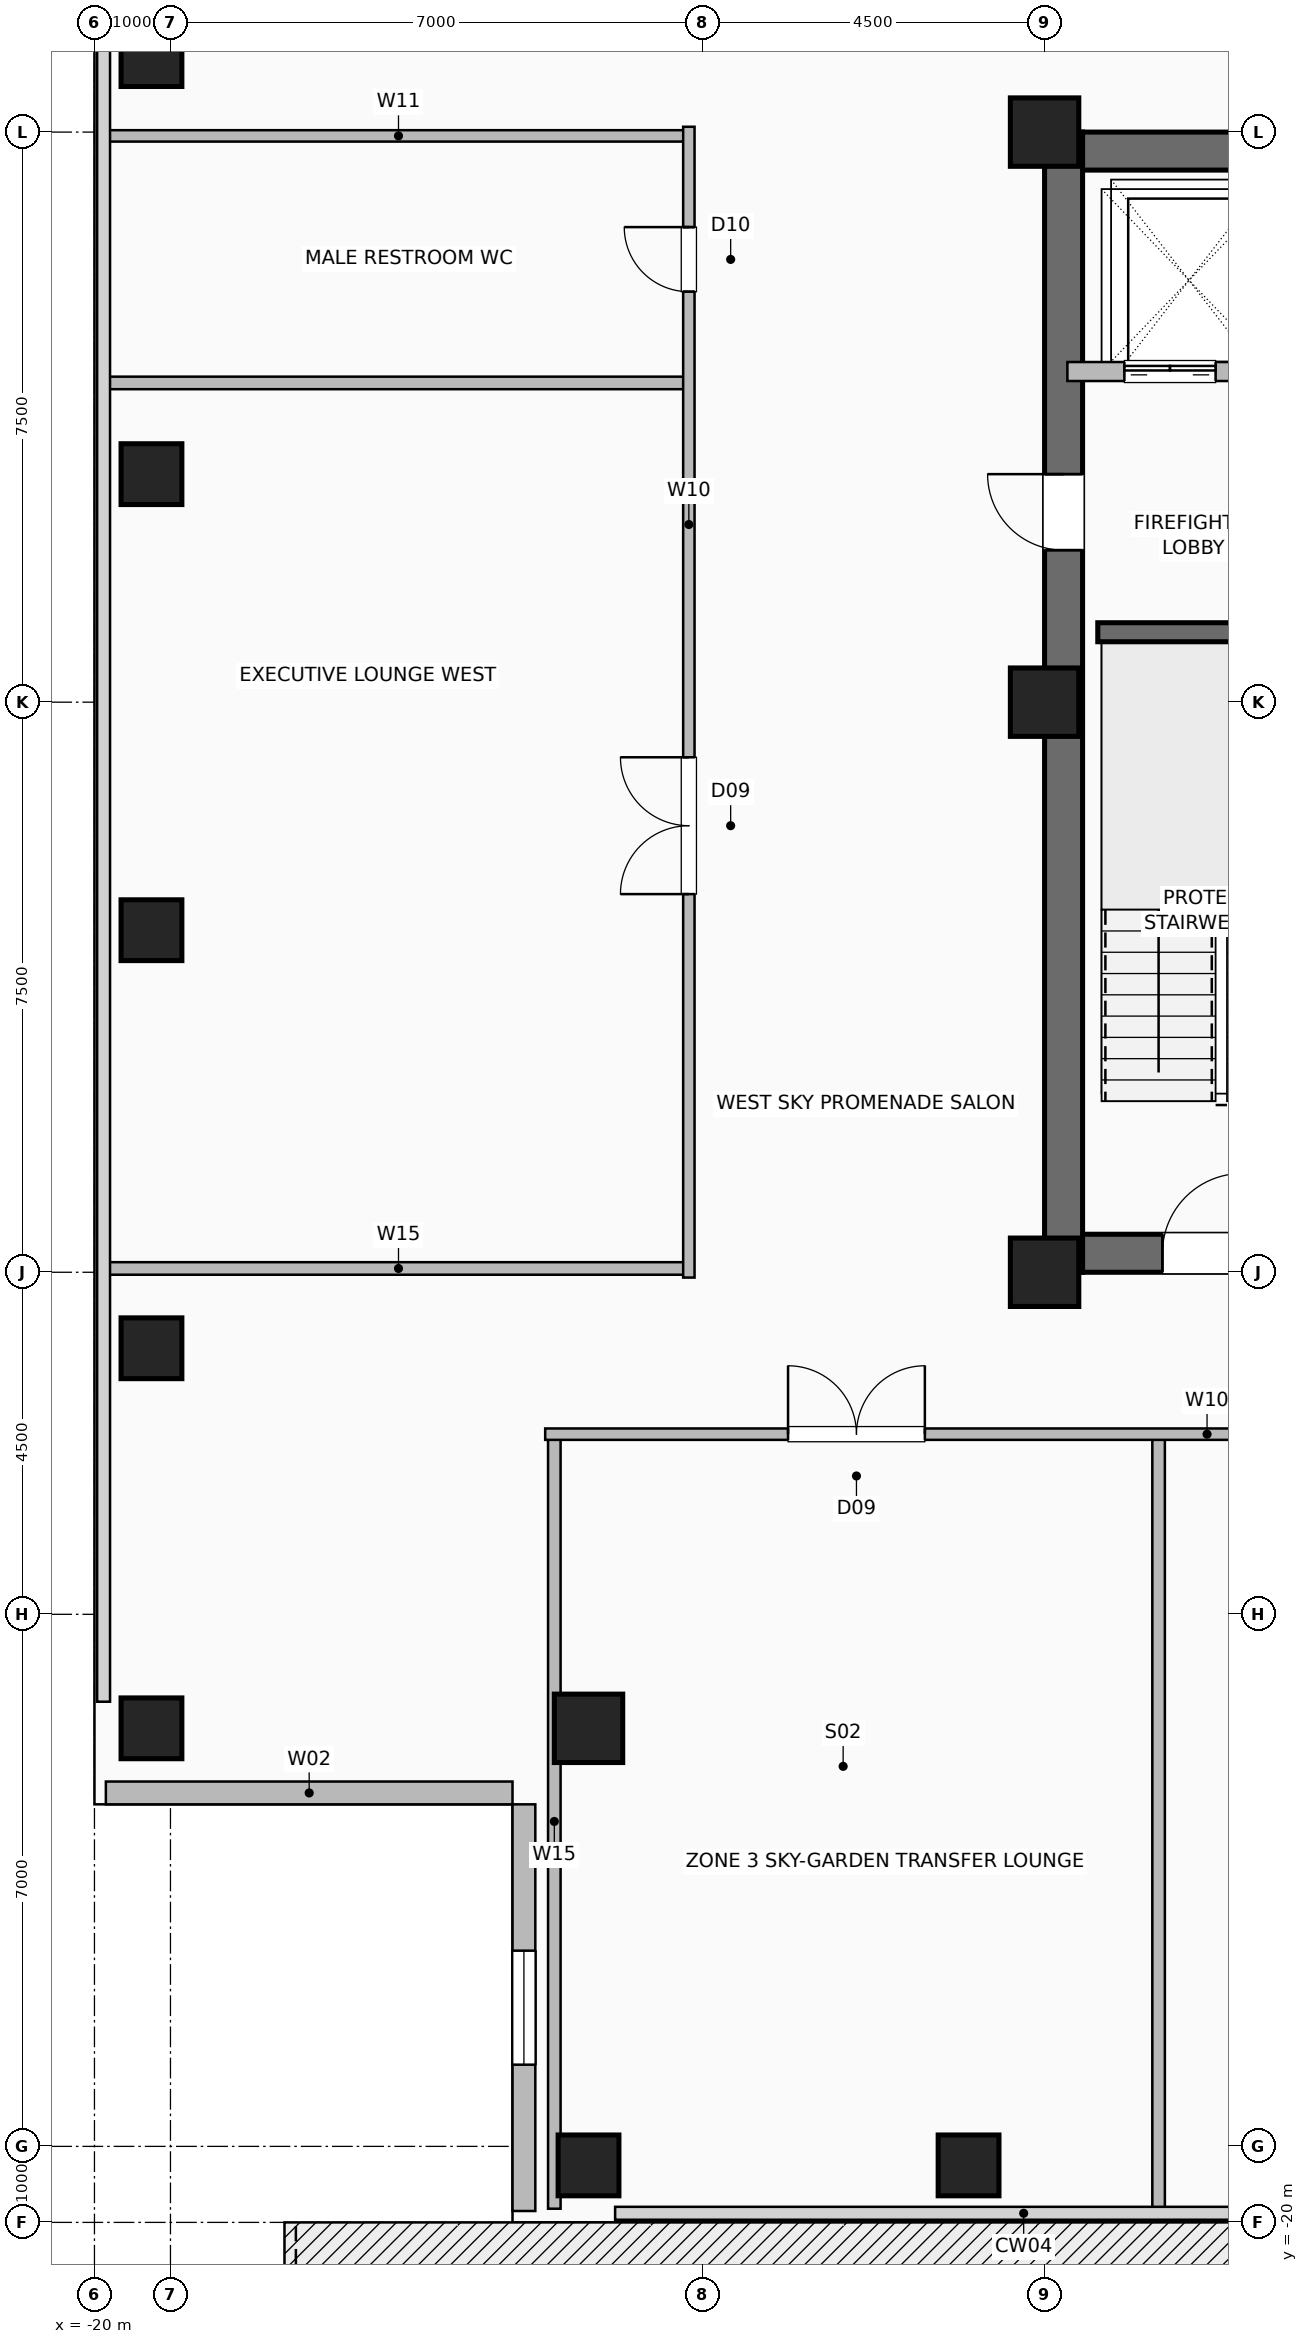
"""IFC4 building model, lengths in metres.
Left out: names, types, materials, properties, quantities, classifications, styles, units other than length and angle.
Written with IfcOpenShell. Run it as: python <this file> out.ifc"""

import sys

from ifc_helpers import new_model, si_unit, direction, frame, frame_2d, origin, origin_2d, place, context, subcontext, project, spatial, rectangle, hollow_rectangle, extrude, element, fill, save


model = new_model("IFC4")
c1 = context("Model", 3, precision=1e-05, world=origin(), true_north=direction((0.0, 1.0)))
c2 = subcontext(c1, "Body", "Model", "MODEL_VIEW")
j1 = project(units=[si_unit("LENGTHUNIT", "METRE"), si_unit("PLANEANGLEUNIT", "RADIAN")], contexts=[c1])
p1 = place(None, origin())
s1 = spatial("IfcSite", under=j1, at=p1, CompositionType="ELEMENT")
p2 = place(p1, origin())
s2 = spatial("IfcBuilding", under=s1, at=p2, CompositionType="ELEMENT")
p3 = place(p2, frame((0.0, 0.0, 166.2)))
s3 = spatial("IfcBuildingStorey", under=s2, at=p3, CompositionType="ELEMENT", Elevation=166.2)
for number, where, z_axis, x_axis in (
    (1, (-7.5, -7.5, 0.0), (0.0, 0.0, 1.0), (1.0, 0.0, 0.0)),
    (2, (-7.5, 7.5, 0.0), (0.0, 0.0, 1.0), (1.0, 0.0, 0.0)),
    (3, (-7.5, 0.0, 0.0), (0.0, 0.0, 1.0), (1.0, 0.0, 0.0)),
):
    element("IfcColumn", number, at=place(p3, frame(where, z_axis=z_axis, x_axis=x_axis)), inside=s3, PredefinedType="COLUMN", context=c2, shape_type="SweptSolid", body=[
        extrude(hollow_rectangle(XDim=0.9, YDim=0.9, WallThickness=0.045, at=origin_2d()), origin(), (0.0, 0.0, 1.0), 3.6),
    ])
for number, where, z_axis, x_axis in (
    (4, (-13.5, -19.25, -0.4), (0.0, 0.0, 1.0), (1.0, 0.0, 0.0)),
    (5, (-19.25, -13.5, -0.4), (0.0, 0.0, 1.0), (1.0, 0.0, 0.0)),
    (6, (-8.5, -19.25, -0.4), (0.0, 0.0, 1.0), (1.0, 0.0, 0.0)),
    (7, (-19.25, -8.5, -0.4), (0.0, 0.0, 1.0), (1.0, 0.0, 0.0)),
    (8, (-19.25, -3.0, -0.4), (0.0, 0.0, 1.0), (1.0, 0.0, 0.0)),
    (9, (-19.25, 3.0, -0.4), (0.0, 0.0, 1.0), (1.0, 0.0, 0.0)),
    (10, (-19.25, 8.5, -0.4), (0.0, 0.0, 1.0), (1.0, 0.0, 0.0)),
):
    element("IfcColumn", number, at=place(p3, frame(where, z_axis=z_axis, x_axis=x_axis)), inside=s3, PredefinedType="COLUMN", context=c2, shape_type="SweptSolid", body=[
        extrude(hollow_rectangle(XDim=0.8, YDim=0.8, WallThickness=0.04, at=origin_2d()), origin(), (0.0, 0.0, 1.0), 4.0),
    ])
p4 = place(p3, frame((-13.5, -13.5, -0.4), z_axis=(0.0, 0.0, 1.0), x_axis=(1.0, 0.0, 0.0)))
e11 = element("IfcColumn", 11, at=p4, inside=s3, PredefinedType="COLUMN", context=c2, shape_type="SweptSolid", body=[
    extrude(hollow_rectangle(XDim=0.9, YDim=0.9, WallThickness=0.045, at=origin_2d()), origin(), (0.0, 0.0, 1.0), 4.0),
])
p5 = place(p3, frame((-14.35, -19.85, 0.0), z_axis=(0.0, 0.0, 1.0), x_axis=(0.0, 1.0, 0.0)))
e12 = element("IfcWall", 12, at=p5, inside=s3, PredefinedType="SOLIDWALL", context=c2, shape_type="SweptSolid", body=[
    extrude(rectangle(XDim=5.35, YDim=0.3, at=frame_2d((2.675, 0.0))), origin(), (0.0, 0.0, 1.0), 3.36),
])
p6 = place(p5, frame((1.925, 0.0, 0.9)))
e13 = element("IfcOpeningElement", 13, at=p6, cuts=e12, PredefinedType="OPENING", context=c2, shape_type="SweptSolid", body=[
    extrude(rectangle(XDim=1.5, YDim=1.8, at=frame_2d((0.75, 0.9))), frame((0.0, 0.16, 0.0), z_axis=(0.0, -1.0, 0.0), x_axis=(1.0, 0.0, 0.0)), (0.0, 0.0, 1.0), 0.32),
])
p7 = place(p3, frame((-19.85, -14.35, 0.0), z_axis=(0.0, 0.0, 1.0), x_axis=(1.0, 0.0, 0.0)))
e14 = element("IfcWall", 14, at=p7, inside=s3, PredefinedType="SOLIDWALL", context=c2, shape_type="SweptSolid", body=[
    extrude(rectangle(XDim=5.35, YDim=0.3, at=frame_2d((2.675, 0.0))), origin(), (0.0, 0.0, 1.0), 3.36),
])
p8 = place(p3, frame((-7.5, -7.25, 0.0), z_axis=(0.0, 0.0, 1.0), x_axis=(1.0, 0.0, 0.0)))
e15 = element("IfcWall", 15, at=p8, inside=s3, PredefinedType="SHEAR", context=c2, shape_type="SweptSolid", body=[
    extrude(rectangle(XDim=15.0, YDim=0.5, at=frame_2d((7.5, 0.0))), origin(), (0.0, 0.0, 1.0), 3.36),
])
p9 = place(p8, frame((1.55, 0.0, 0.0)))
e16 = element("IfcOpeningElement", 16, at=p9, cuts=e15, PredefinedType="OPENING", context=c2, shape_type="SweptSolid", body=[
    extrude(rectangle(XDim=1.05, YDim=2.08, at=frame_2d((0.525, 1.04))), frame((0.0, 0.26, 0.0), z_axis=(0.0, -1.0, 0.0), x_axis=(1.0, 0.0, 0.0)), (0.0, 0.0, 1.0), 0.52),
])
p10 = place(p8, frame((12.4, 0.0, 0.0)))
e17 = element("IfcOpeningElement", 17, at=p10, cuts=e15, PredefinedType="OPENING", context=c2, shape_type="SweptSolid", body=[
    extrude(rectangle(XDim=1.05, YDim=2.08, at=frame_2d((0.525, 1.04))), frame((0.0, 0.26, 0.0), z_axis=(0.0, -1.0, 0.0), x_axis=(1.0, 0.0, 0.0)), (0.0, 0.0, 1.0), 0.52),
])
p11 = place(p8, frame((5.2, 0.0, 0.0)))
e18 = element("IfcOpeningElement", 18, at=p11, cuts=e15, PredefinedType="OPENING", context=c2, shape_type="SweptSolid", body=[
    extrude(rectangle(XDim=1.0, YDim=2.08, at=frame_2d((0.5, 1.04))), frame((0.0, 0.26, 0.0), z_axis=(0.0, -1.0, 0.0), x_axis=(1.0, 0.0, 0.0)), (0.0, 0.0, 1.0), 0.52),
])
p12 = place(p8, frame((8.65, 0.0, 0.0)))
e19 = element("IfcOpeningElement", 19, at=p12, cuts=e15, PredefinedType="OPENING", context=c2, shape_type="SweptSolid", body=[
    extrude(rectangle(XDim=1.0, YDim=2.08, at=frame_2d((0.5, 1.04))), frame((0.0, 0.26, 0.0), z_axis=(0.0, -1.0, 0.0), x_axis=(1.0, 0.0, 0.0)), (0.0, 0.0, 1.0), 0.52),
])
p13 = place(p3, frame((-7.5, 7.25, 0.0), z_axis=(0.0, 0.0, 1.0), x_axis=(1.0, 0.0, 0.0)))
e20 = element("IfcWall", 20, at=p13, inside=s3, PredefinedType="SHEAR", context=c2, shape_type="SweptSolid", body=[
    extrude(rectangle(XDim=15.0, YDim=0.5, at=frame_2d((7.5, 0.0))), origin(), (0.0, 0.0, 1.0), 3.36),
])
p14 = place(p3, frame((-7.25, -7.5, 0.0), z_axis=(0.0, 0.0, 1.0), x_axis=(0.0, 1.0, 0.0)))
e21 = element("IfcWall", 21, at=p14, inside=s3, PredefinedType="SHEAR", context=c2, shape_type="SweptSolid", body=[
    extrude(rectangle(XDim=15.0, YDim=0.5, at=frame_2d((7.5, 0.0))), origin(), (0.0, 0.0, 1.0), 3.36),
])
p15 = place(p14, frame((9.5, 0.0, 0.0)))
e22 = element("IfcOpeningElement", 22, at=p15, cuts=e21, PredefinedType="OPENING", context=c2, shape_type="SweptSolid", body=[
    extrude(rectangle(XDim=1.0, YDim=2.08, at=frame_2d((0.5, 1.04))), frame((0.0, 0.26, 0.0), z_axis=(0.0, -1.0, 0.0), x_axis=(1.0, 0.0, 0.0)), (0.0, 0.0, 1.0), 0.52),
])
p16 = place(p3, frame((-6.8, 0.92, 0.0), z_axis=(0.0, 0.0, 1.0), x_axis=(1.0, 0.0, 0.0)))
e23 = element("IfcWall", 23, at=p16, inside=s3, PredefinedType="SHEAR", context=c2, shape_type="SweptSolid", body=[
    extrude(rectangle(XDim=3.33, YDim=0.25, at=frame_2d((1.665, 0.0))), origin(), (0.0, 0.0, 1.0), 3.36),
])
p17 = place(p3, frame((-7.2, 4.35, 0.0), z_axis=(0.0, 0.0, 1.0), x_axis=(1.0, 0.0, 0.0)))
e24 = element("IfcWall", 24, at=p17, inside=s3, PredefinedType="SHEAR", context=c2, shape_type="SweptSolid", body=[
    extrude(rectangle(XDim=2.7, YDim=0.25, at=frame_2d((1.35, 0.0))), origin(), (0.0, 0.0, 1.0), 3.36),
])
p18 = place(p17, frame((0.75, 0.0, 0.0)))
e25 = element("IfcOpeningElement", 25, at=p18, cuts=e24, PredefinedType="OPENING", context=c2, shape_type="SweptSolid", body=[
    extrude(rectangle(XDim=1.2, YDim=2.2, at=frame_2d((0.6, 1.1))), frame((0.0, 0.135, 0.0), z_axis=(0.0, -1.0, 0.0), x_axis=(1.0, 0.0, 0.0)), (0.0, 0.0, 1.0), 0.27),
])
for number, where, z_axis, x_axis in (
    (26, (-13.95, -19.82, 0.0), (0.0, 0.0, 1.0), (0.0, 1.0, 0.0)),
    (27, (-6.0, -19.82, 0.0), (0.0, 0.0, 1.0), (0.0, 1.0, 0.0)),
):
    element("IfcWall", number, at=place(p3, frame(where, z_axis=z_axis, x_axis=x_axis)), inside=s3, PredefinedType="PLUMBINGWALL", context=c2, shape_type="SweptSolid", body=[
        extrude(rectangle(XDim=10.19, YDim=0.165, at=frame_2d((5.095, 0.0))), origin(), (0.0, 0.0, 1.0), 3.36),
    ])
p19 = place(p3, frame((-14.07, -9.63, 0.0), z_axis=(0.0, 0.0, 1.0), x_axis=(1.0, 0.0, 0.0)))
e28 = element("IfcWall", 28, at=p19, inside=s3, PredefinedType="PARTITIONING", context=c2, shape_type="SweptSolid", body=[
    extrude(rectangle(XDim=28.14, YDim=0.15, at=frame_2d((14.07, 0.0))), origin(), (0.0, 0.0, 1.0), 3.36),
])
p20 = place(p19, frame((3.195, 0.0, 0.0)))
e29 = element("IfcOpeningElement", 29, at=p20, cuts=e28, PredefinedType="OPENING", context=c2, shape_type="SweptSolid", body=[
    extrude(rectangle(XDim=1.8, YDim=2.08, at=frame_2d((0.9, 1.04))), frame((0.0, 0.085, 0.0), z_axis=(0.0, -1.0, 0.0), x_axis=(1.0, 0.0, 0.0)), (0.0, 0.0, 1.0), 0.17),
])
p21 = place(p19, frame((12.42, 0.0, 0.0)))
e30 = element("IfcOpeningElement", 30, at=p21, cuts=e28, PredefinedType="OPENING", context=c2, shape_type="SweptSolid", body=[
    extrude(rectangle(XDim=1.8, YDim=2.08, at=frame_2d((0.9, 1.04))), frame((0.0, 0.085, 0.0), z_axis=(0.0, -1.0, 0.0), x_axis=(1.0, 0.0, 0.0)), (0.0, 0.0, 1.0), 0.17),
])
p22 = place(p19, frame((21.445, 0.0, 0.0)))
e31 = element("IfcOpeningElement", 31, at=p22, cuts=e28, PredefinedType="OPENING", context=c2, shape_type="SweptSolid", body=[
    extrude(rectangle(XDim=0.95, YDim=2.06, at=frame_2d((0.475, 1.03))), frame((0.0, 0.085, 0.0), z_axis=(0.0, -1.0, 0.0), x_axis=(1.0, 0.0, 0.0)), (0.0, 0.0, 1.0), 0.17),
])
p23 = place(p19, frame((26.22, 0.0, 0.0)))
e32 = element("IfcOpeningElement", 32, at=p23, cuts=e28, PredefinedType="OPENING", context=c2, shape_type="SweptSolid", body=[
    extrude(rectangle(XDim=0.85, YDim=2.05, at=frame_2d((0.425, 1.025))), frame((0.0, 0.085, 0.0), z_axis=(0.0, -1.0, 0.0), x_axis=(1.0, 0.0, 0.0)), (0.0, 0.0, 1.0), 0.17),
])
for number, where, z_axis, x_axis in (
    (33, (-19.82, -7.45, 0.0), (0.0, 0.0, 1.0), (1.0, 0.0, 0.0)),
    (34, (-19.82, 4.2, 0.0), (0.0, 0.0, 1.0), (1.0, 0.0, 0.0)),
):
    element("IfcWall", number, at=place(p3, frame(where, z_axis=z_axis, x_axis=x_axis)), inside=s3, PredefinedType="PLUMBINGWALL", context=c2, shape_type="SweptSolid", body=[
        extrude(rectangle(XDim=7.64, YDim=0.165, at=frame_2d((3.82, 0.0))), origin(), (0.0, 0.0, 1.0), 3.36),
    ])
p24 = place(p3, frame((-19.82, 7.45, 0.0), z_axis=(0.0, 0.0, 1.0), x_axis=(1.0, 0.0, 0.0)))
e35 = element("IfcWall", 35, at=p24, inside=s3, PredefinedType="PARTITIONING", context=c2, shape_type="SweptSolid", body=[
    extrude(rectangle(XDim=7.64, YDim=0.15, at=frame_2d((3.82, 0.0))), origin(), (0.0, 0.0, 1.0), 3.36),
])
p25 = place(p3, frame((-12.18, -7.57, 0.0), z_axis=(0.0, 0.0, 1.0), x_axis=(0.0, 1.0, 0.0)))
e36 = element("IfcWall", 36, at=p25, inside=s3, PredefinedType="PARTITIONING", context=c2, shape_type="SweptSolid", body=[
    extrude(rectangle(XDim=15.14, YDim=0.15, at=frame_2d((7.57, 0.0))), origin(), (0.0, 0.0, 1.0), 3.36),
])
p26 = place(p25, frame((5.045, 0.0, 0.0)))
e37 = element("IfcOpeningElement", 37, at=p26, cuts=e36, PredefinedType="OPENING", context=c2, shape_type="SweptSolid", body=[
    extrude(rectangle(XDim=1.8, YDim=2.08, at=frame_2d((0.9, 1.04))), frame((0.0, 0.085, 0.0), z_axis=(0.0, -1.0, 0.0), x_axis=(1.0, 0.0, 0.0)), (0.0, 0.0, 1.0), 0.17),
])
p27 = place(p25, frame((12.97, 0.0, 0.0)))
e38 = element("IfcOpeningElement", 38, at=p27, cuts=e36, PredefinedType="OPENING", context=c2, shape_type="SweptSolid", body=[
    extrude(rectangle(XDim=0.85, YDim=2.05, at=frame_2d((0.425, 1.025))), frame((0.0, 0.085, 0.0), z_axis=(0.0, -1.0, 0.0), x_axis=(1.0, 0.0, 0.0)), (0.0, 0.0, 1.0), 0.17),
])
p28 = place(p6, origin())
e39 = element("IfcWindow", 39, at=p28, inside=s3, PartitioningType="SINGLE_PANEL", PredefinedType="WINDOW", context=c2, shape_type="SweptSolid", body=[
    extrude(rectangle(XDim=1.5, YDim=1.8, at=frame_2d((0.75, 0.9))), frame((0.0, 0.03, 0.0), z_axis=(0.0, -1.0, 0.0), x_axis=(1.0, 0.0, 0.0)), (0.0, 0.0, 1.0), 0.06),
])
fill(e13, e39)
p29 = place(p9, origin())
e40 = element("IfcDoor", 40, at=p29, inside=s3, OperationType="SINGLE_SWING_RIGHT", PredefinedType="DOOR", context=c2, shape_type="SweptSolid", body=[
    extrude(rectangle(XDim=1.05, YDim=2.08, at=frame_2d((0.525, 1.04))), frame((0.0, 0.025, 0.0), z_axis=(0.0, -1.0, 0.0), x_axis=(1.0, 0.0, 0.0)), (0.0, 0.0, 1.0), 0.05),
])
fill(e16, e40)
p30 = place(p15, origin())
e41 = element("IfcDoor", 41, at=p30, inside=s3, OperationType="SINGLE_SWING_RIGHT", PredefinedType="DOOR", context=c2, shape_type="SweptSolid", body=[
    extrude(rectangle(XDim=1.0, YDim=2.08, at=frame_2d((0.5, 1.04))), frame((0.0, 0.025, 0.0), z_axis=(0.0, -1.0, 0.0), x_axis=(1.0, 0.0, 0.0)), (0.0, 0.0, 1.0), 0.05),
])
fill(e22, e41)
p31 = place(p18, origin())
e42 = element("IfcDoor", 42, at=p31, inside=s3, OperationType="DOUBLE_DOOR_SLIDING", PredefinedType="DOOR", context=c2, shape_type="SweptSolid", body=[
    extrude(rectangle(XDim=1.2, YDim=2.2, at=frame_2d((0.6, 1.1))), frame((0.0, 0.025, 0.0), z_axis=(0.0, -1.0, 0.0), x_axis=(1.0, 0.0, 0.0)), (0.0, 0.0, 1.0), 0.05),
])
fill(e25, e42)
p32 = place(p20, origin())
e43 = element("IfcDoor", 43, at=p32, inside=s3, OperationType="DOUBLE_DOOR_SINGLE_SWING", PredefinedType="DOOR", context=c2, shape_type="SweptSolid", body=[
    extrude(rectangle(XDim=1.8, YDim=2.08, at=frame_2d((0.9, 1.04))), frame((0.0, 0.025, 0.0), z_axis=(0.0, -1.0, 0.0), x_axis=(1.0, 0.0, 0.0)), (0.0, 0.0, 1.0), 0.05),
])
fill(e29, e43)
p33 = place(p26, origin())
e44 = element("IfcDoor", 44, at=p33, inside=s3, OperationType="DOUBLE_DOOR_SINGLE_SWING", PredefinedType="DOOR", context=c2, shape_type="SweptSolid", body=[
    extrude(rectangle(XDim=1.8, YDim=2.08, at=frame_2d((0.9, 1.04))), frame((0.0, 0.025, 0.0), z_axis=(0.0, -1.0, 0.0), x_axis=(1.0, 0.0, 0.0)), (0.0, 0.0, 1.0), 0.05),
])
fill(e37, e44)
p34 = place(p27, origin())
e45 = element("IfcDoor", 45, at=p34, inside=s3, OperationType="SINGLE_SWING_RIGHT", PredefinedType="DOOR", context=c2, shape_type="SweptSolid", body=[
    extrude(rectangle(XDim=0.85, YDim=2.05, at=frame_2d((0.425, 1.025))), frame((0.0, 0.025, 0.0), z_axis=(0.0, -1.0, 0.0), x_axis=(1.0, 0.0, 0.0)), (0.0, 0.0, 1.0), 0.05),
])
fill(e38, e45)
save(model, sys.argv[1])
